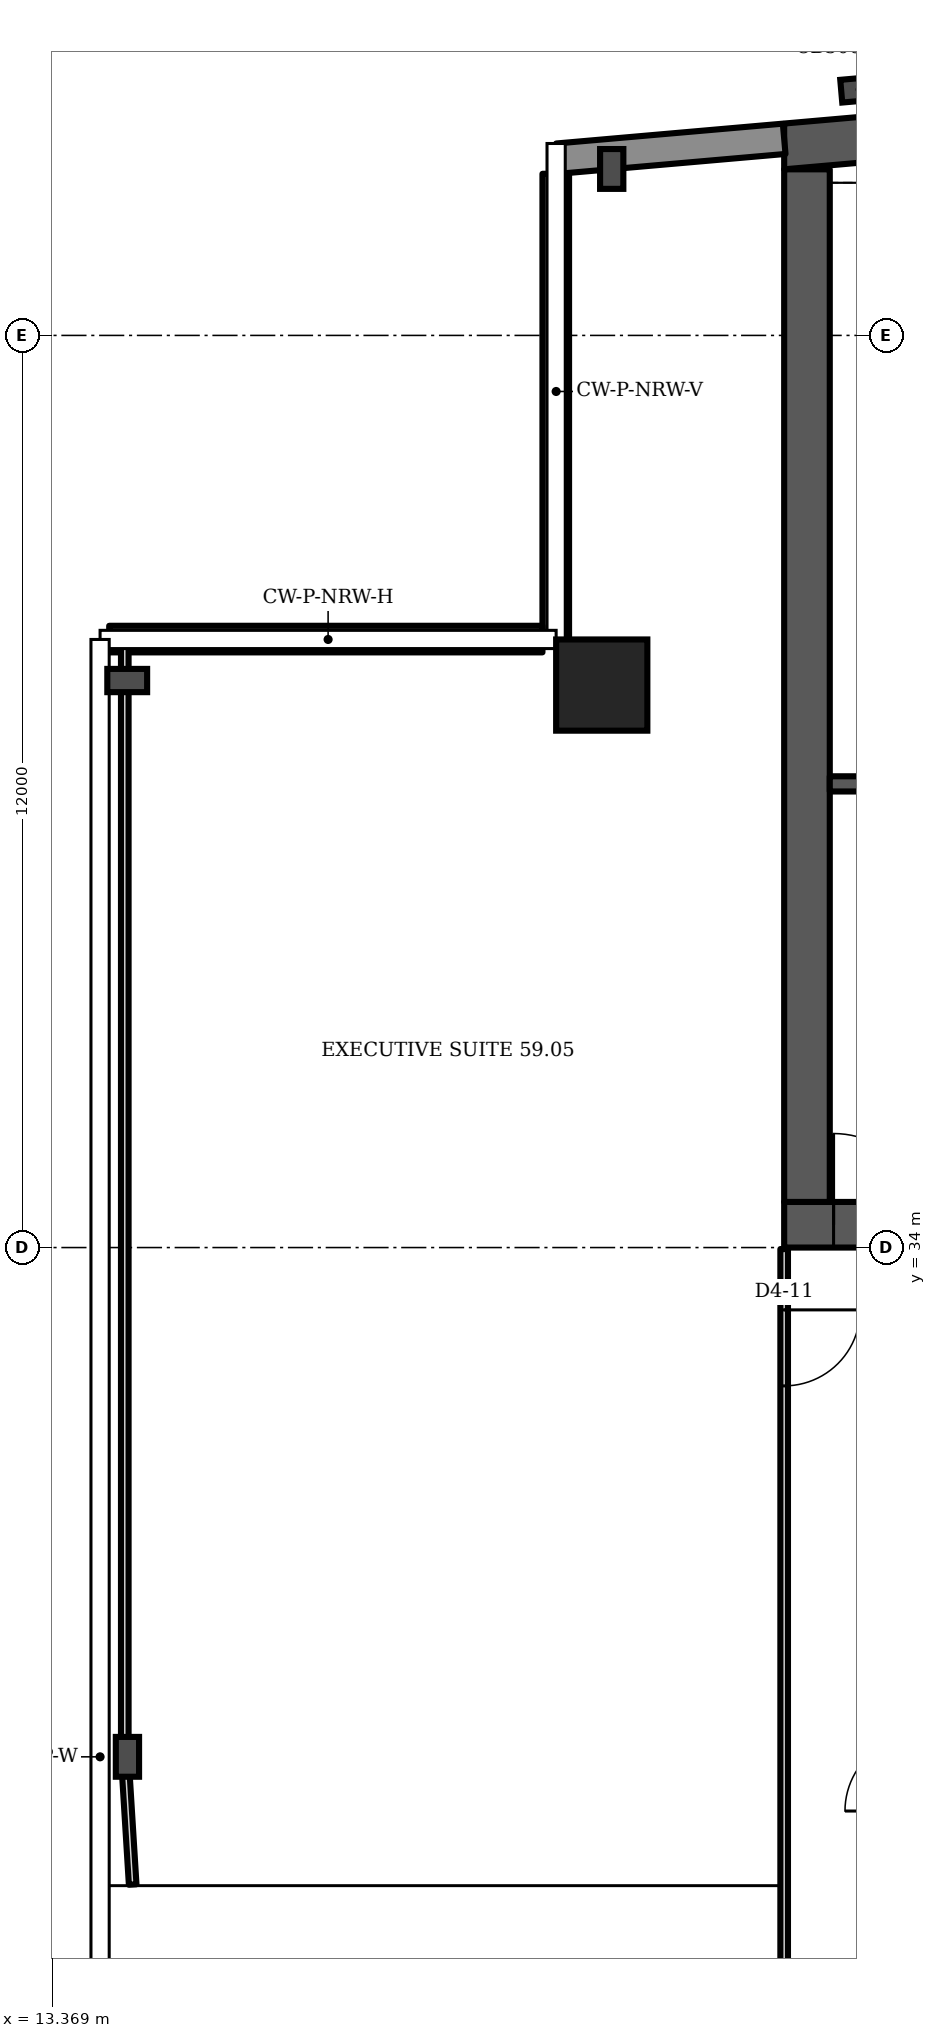
"""IFC4 building model, lengths in metres.
Left out: names, types, materials, properties, quantities, classifications, styles, units other than length and angle.
Written with IfcOpenShell. Run it as: python <this file> out.ifc"""

import sys

from ifc_helpers import new_model, si_unit, direction, frame, frame_2d, origin, origin_2d, place, context, subcontext, project, spatial, polyline, rectangle, i_section, outline, extrude, element, fill, save


model = new_model("IFC4")
c1 = context("Model", 3, precision=1e-05, world=origin(), true_north=direction((0.0, 1.0)))
c2 = subcontext(c1, "Body", "Model", "MODEL_VIEW")
j1 = project(units=[si_unit("LENGTHUNIT", "METRE"), si_unit("PLANEANGLEUNIT", "RADIAN")], contexts=[c1])
p1 = place(None, origin())
s1 = spatial("IfcSite", under=j1, at=p1, CompositionType="ELEMENT")
p2 = place(p1, origin())
s2 = spatial("IfcBuilding", under=s1, at=p2, CompositionType="ELEMENT")
p3 = place(p2, frame((0.0, 0.0, 235.9)))
s3 = spatial("IfcBuildingStorey", under=s2, at=p3, CompositionType="ELEMENT", Elevation=235.9)
p4 = place(p3, origin())
e1 = element("IfcWall", 1, at=p4, inside=s3, PredefinedType="SHEAR", context=c2, shape_type="SweptSolid", body=[
    extrude(outline(polyline([(23.0, 48.185), (40.5, 49.716), (58.0, 48.185), (58.0, 48.787), (40.5, 50.318), (23.0, 48.787), (23.0, 48.185)])), origin(), (0.0, 0.0, 1.0), 3.6),
])
p5 = place(p3, frame((23.0, 34.3, 0.0), z_axis=(0.0, 0.0, 1.0), x_axis=(1.0, 0.0, 0.0)))
e2 = element("IfcWall", 2, at=p5, inside=s3, PredefinedType="SHEAR", context=c2, shape_type="SweptSolid", body=[
    extrude(rectangle(XDim=35.0, YDim=0.6, at=frame_2d((17.5, 0.0))), origin(), (0.0, 0.0, 1.0), 3.6),
])
p6 = place(p5, frame((0.65, 0.0, 0.0)))
e3 = element("IfcOpeningElement", 3, at=p6, cuts=e2, PredefinedType="OPENING", context=c2, shape_type="SweptSolid", body=[
    extrude(rectangle(XDim=1.2, YDim=2.1, at=frame_2d((0.6, 1.05))), frame((0.0, 0.31, 0.0), z_axis=(0.0, -1.0, 0.0), x_axis=(1.0, 0.0, 0.0)), (0.0, 0.0, 1.0), 0.62),
])
p7 = place(p5, frame((7.717, 0.0, 0.0)))
e4 = element("IfcOpeningElement", 4, at=p7, cuts=e2, PredefinedType="OPENING", context=c2, shape_type="SweptSolid", body=[
    extrude(rectangle(XDim=1.1, YDim=2.1, at=frame_2d((0.55, 1.05))), frame((0.0, 0.31, 0.0), z_axis=(0.0, -1.0, 0.0), x_axis=(1.0, 0.0, 0.0)), (0.0, 0.0, 1.0), 0.62),
])
p8 = place(p5, frame((12.183, 0.0, 0.0)))
e5 = element("IfcOpeningElement", 5, at=p8, cuts=e2, PredefinedType="OPENING", context=c2, shape_type="SweptSolid", body=[
    extrude(rectangle(XDim=1.1, YDim=2.1, at=frame_2d((0.55, 1.05))), frame((0.0, 0.31, 0.0), z_axis=(0.0, -1.0, 0.0), x_axis=(1.0, 0.0, 0.0)), (0.0, 0.0, 1.0), 0.62),
])
p9 = place(p5, frame((9.8, 0.0, 0.0)))
e6 = element("IfcOpeningElement", 6, at=p9, cuts=e2, PredefinedType="OPENING", context=c2, shape_type="SweptSolid", body=[
    extrude(rectangle(XDim=1.4, YDim=2.1, at=frame_2d((0.7, 1.05))), frame((0.0, 0.31, 0.0), z_axis=(0.0, -1.0, 0.0), x_axis=(1.0, 0.0, 0.0)), (0.0, 0.0, 1.0), 0.62),
])
p10 = place(p5, frame((14.717, 0.0, 0.0)))
e7 = element("IfcOpeningElement", 7, at=p10, cuts=e2, PredefinedType="OPENING", context=c2, shape_type="SweptSolid", body=[
    extrude(rectangle(XDim=1.1, YDim=2.1, at=frame_2d((0.55, 1.05))), frame((0.0, 0.31, 0.0), z_axis=(0.0, -1.0, 0.0), x_axis=(1.0, 0.0, 0.0)), (0.0, 0.0, 1.0), 0.62),
])
p11 = place(p5, frame((16.95, 0.0, 0.0)))
e8 = element("IfcOpeningElement", 8, at=p11, cuts=e2, PredefinedType="OPENING", context=c2, shape_type="SweptSolid", body=[
    extrude(rectangle(XDim=1.1, YDim=2.1, at=frame_2d((0.55, 1.05))), frame((0.0, 0.31, 0.0), z_axis=(0.0, -1.0, 0.0), x_axis=(1.0, 0.0, 0.0)), (0.0, 0.0, 1.0), 0.62),
])
p12 = place(p5, frame((19.183, 0.0, 0.0)))
e9 = element("IfcOpeningElement", 9, at=p12, cuts=e2, PredefinedType="OPENING", context=c2, shape_type="SweptSolid", body=[
    extrude(rectangle(XDim=1.1, YDim=2.1, at=frame_2d((0.55, 1.05))), frame((0.0, 0.31, 0.0), z_axis=(0.0, -1.0, 0.0), x_axis=(1.0, 0.0, 0.0)), (0.0, 0.0, 1.0), 0.62),
])
p13 = place(p5, frame((26.15, 0.0, 0.0)))
e10 = element("IfcOpeningElement", 10, at=p13, cuts=e2, PredefinedType="OPENING", context=c2, shape_type="SweptSolid", body=[
    extrude(rectangle(XDim=1.2, YDim=2.1, at=frame_2d((0.6, 1.05))), frame((0.0, 0.31, 0.0), z_axis=(0.0, -1.0, 0.0), x_axis=(1.0, 0.0, 0.0)), (0.0, 0.0, 1.0), 0.62),
])
p14 = place(p5, frame((30.8, 0.0, 0.0)))
e11 = element("IfcOpeningElement", 11, at=p14, cuts=e2, PredefinedType="OPENING", context=c2, shape_type="SweptSolid", body=[
    extrude(rectangle(XDim=1.4, YDim=2.1, at=frame_2d((0.7, 1.05))), frame((0.0, 0.31, 0.0), z_axis=(0.0, -1.0, 0.0), x_axis=(1.0, 0.0, 0.0)), (0.0, 0.0, 1.0), 0.62),
])
p15 = place(p3, frame((23.3, 34.6, 0.0), z_axis=(0.0, 0.0, 1.0), x_axis=(0.0, 1.0, 0.0)))
e12 = element("IfcWall", 12, at=p15, inside=s3, PredefinedType="SHEAR", context=c2, shape_type="SweptSolid", body=[
    extrude(rectangle(XDim=13.585, YDim=0.6, at=frame_2d((6.792, 0.0))), origin(), (0.0, 0.0, 1.0), 3.6),
])
p16 = place(p3, frame((20.6, 41.4, 0.0), z_axis=(0.0, 0.0, 1.0), x_axis=(1.0, 0.0, 0.0)))
e13 = element("IfcColumn", 13, at=p16, inside=s3, PredefinedType="COLUMN", context=c2, shape_type="SweptSolid", body=[
    extrude(rectangle(XDim=1.2, YDim=1.2, at=origin_2d()), origin(), (0.0, 0.0, 1.0), 3.6),
])
for number, where, z_axis, x_axis in (
    (14, (20.731, 48.19, 0.0), (0.0, 0.0, 1.0), (-1.0, 0.0, 0.0)),
    (15, (14.357, 41.46, 0.0), (0.0, 0.0, 1.0), (0.0, 1.0, 0.0)),
    (16, (14.36, 27.3, 0.0), (0.0, 0.0, 1.0), (-1.0, 0.0, 0.0)),
):
    element("IfcColumn", number, at=place(p3, frame(where, z_axis=z_axis, x_axis=x_axis)), inside=s3, PredefinedType="COLUMN", context=c2, shape_type="SweptSolid", body=[
        extrude(i_section(OverallWidth=0.306, OverallDepth=0.524, WebThickness=0.021, FlangeThickness=0.04, FilletRadius=0.027, at=origin_2d()), origin(), (0.0, 0.0, 1.0), 3.6),
    ])
p17 = place(p3, frame((24.0, 49.235, 0.0), z_axis=(0.0, 0.0, 1.0), x_axis=(-0.087156, 0.996197, 0.0)))
e17 = element("IfcColumn", 17, at=p17, inside=s3, PredefinedType="COLUMN", context=c2, shape_type="SweptSolid", body=[
    extrude(i_section(OverallWidth=0.3, OverallDepth=0.5, WebThickness=0.014, FlangeThickness=0.028, FilletRadius=0.027, at=origin_2d()), origin(), (0.0, 0.0, 1.0), 3.6),
])
p18 = place(p3, frame((23.0, 48.587, 0.0), z_axis=(0.0, 0.0, 1.0), x_axis=(-0.996194, -0.087168, 0.0)))
e18 = element("IfcWall", 18, at=p18, inside=s3, PredefinedType="SOLIDWALL", context=c2, shape_type="SweptSolid", body=[
    extrude(rectangle(XDim=2.994, YDim=0.4, at=frame_2d((1.497, 0.0))), origin(), (0.0, 0.0, 1.0), 3.2),
])
p19 = place(p3, frame((19.995, 48.126, 0.0), z_axis=(0.0, 0.0, 1.0), x_axis=(0.0, -1.0, 0.0)))
e19 = element("IfcWall", 19, at=p19, inside=s3, PredefinedType="SOLIDWALL", context=c2, shape_type="SweptSolid", body=[
    extrude(rectangle(XDim=6.126, YDim=0.35, at=frame_2d((3.063, 0.0))), origin(), (0.0, 0.0, 1.0), 1.0),
])
p20 = place(p3, frame((19.82, 42.005, 0.0), z_axis=(0.0, 0.0, 1.0), x_axis=(-1.0, 0.0, 0.0)))
e20 = element("IfcWall", 20, at=p20, inside=s3, PredefinedType="SOLIDWALL", context=c2, shape_type="SweptSolid", body=[
    extrude(rectangle(XDim=5.7, YDim=0.35, at=frame_2d((2.85, 0.0))), origin(), (0.0, 0.0, 1.0), 1.0),
])
p21 = place(p3, frame((23.6, 40.1, 0.0), z_axis=(0.0, 0.0, 1.0), x_axis=(1.0, 0.0, 0.0)))
e21 = element("IfcWall", 21, at=p21, inside=s3, PredefinedType="SHEAR", context=c2, shape_type="SweptSolid", body=[
    extrude(rectangle(XDim=6.1, YDim=0.2, at=frame_2d((3.05, 0.0))), origin(), (0.0, 0.0, 1.0), 3.2),
])
p22 = place(p21, frame((3.325, 0.0, 0.0)))
e22 = element("IfcOpeningElement", 22, at=p22, cuts=e21, PredefinedType="OPENING", context=c2, shape_type="SweptSolid", body=[
    extrude(rectangle(XDim=1.2, YDim=2.1, at=frame_2d((0.6, 1.05))), frame((0.0, 0.11, 0.0), z_axis=(0.0, -1.0, 0.0), x_axis=(1.0, 0.0, 0.0)), (0.0, 0.0, 1.0), 0.22),
])
p23 = place(p21, frame((0.475, 0.0, 0.0)))
e23 = element("IfcOpeningElement", 23, at=p23, cuts=e21, PredefinedType="OPENING", context=c2, shape_type="SweptSolid", body=[
    extrude(rectangle(XDim=0.9, YDim=2.1, at=frame_2d((0.45, 1.05))), frame((0.0, 0.11, 0.0), z_axis=(0.0, -1.0, 0.0), x_axis=(1.0, 0.0, 0.0)), (0.0, 0.0, 1.0), 0.22),
])
p24 = place(p3, frame((14.325, 27.3, 0.0), z_axis=(0.0, 0.0, 1.0), x_axis=(0.0, 1.0, 0.0)))
e24 = element("IfcWall", 24, at=p24, inside=s3, PredefinedType="PARTITIONING", context=c2, shape_type="SweptSolid", body=[
    extrude(rectangle(XDim=14.68, YDim=0.1, at=frame_2d((7.34, 0.0))), origin(), (0.0, 0.0, 1.0), 2.58),
])
p25 = place(p3, frame((14.429, 25.62, 0.0), z_axis=(0.0, 0.0, 1.0), x_axis=(-0.061647, 0.998101, 0.0)))
e25 = element("IfcWall", 25, at=p25, inside=s3, PredefinedType="PARTITIONING", context=c2, shape_type="SweptSolid", body=[
    extrude(rectangle(XDim=1.683, YDim=0.1, at=frame_2d((0.842, 0.0))), origin(), (0.0, 0.0, 1.0), 2.58),
])
p26 = place(p3, frame((23.0, 24.275, 0.0), z_axis=(0.0, 0.0, 1.0), x_axis=(0.0, 1.0, 0.0)))
e26 = element("IfcWall", 26, at=p26, inside=s3, PredefinedType="PARTITIONING", context=c2, shape_type="SweptSolid", body=[
    extrude(rectangle(XDim=9.705, YDim=0.1, at=frame_2d((4.853, 0.0))), origin(), (0.0, 0.0, 1.0), 3.2),
])
p27 = place(p26, frame((7.905, 0.0, 0.0)))
e27 = element("IfcOpeningElement", 27, at=p27, cuts=e26, PredefinedType="OPENING", context=c2, shape_type="SweptSolid", body=[
    extrude(rectangle(XDim=1.0, YDim=2.1, at=frame_2d((0.5, 1.05))), frame((0.0, 0.06, 0.0), z_axis=(0.0, -1.0, 0.0), x_axis=(1.0, 0.0, 0.0)), (0.0, 0.0, 1.0), 0.12),
])
p28 = place(p6, origin())
e28 = element("IfcDoor", 28, at=p28, inside=s3, OperationType="SINGLE_SWING_LEFT", PredefinedType="DOOR", context=c2, shape_type="SweptSolid", body=[
    extrude(rectangle(XDim=1.2, YDim=2.1, at=frame_2d((0.6, 1.05))), frame((0.0, 0.025, 0.0), z_axis=(0.0, -1.0, 0.0), x_axis=(1.0, 0.0, 0.0)), (0.0, 0.0, 1.0), 0.05),
])
fill(e3, e28)
p29 = place(p27, origin())
e29 = element("IfcDoor", 29, at=p29, inside=s3, OperationType="SINGLE_SWING_RIGHT", PredefinedType="DOOR", context=c2, shape_type="SweptSolid", body=[
    extrude(rectangle(XDim=1.0, YDim=2.1, at=frame_2d((0.5, 1.05))), frame((0.0, 0.025, 0.0), z_axis=(0.0, -1.0, 0.0), x_axis=(1.0, 0.0, 0.0)), (0.0, 0.0, 1.0), 0.05),
])
fill(e27, e29)
save(model, sys.argv[1])
